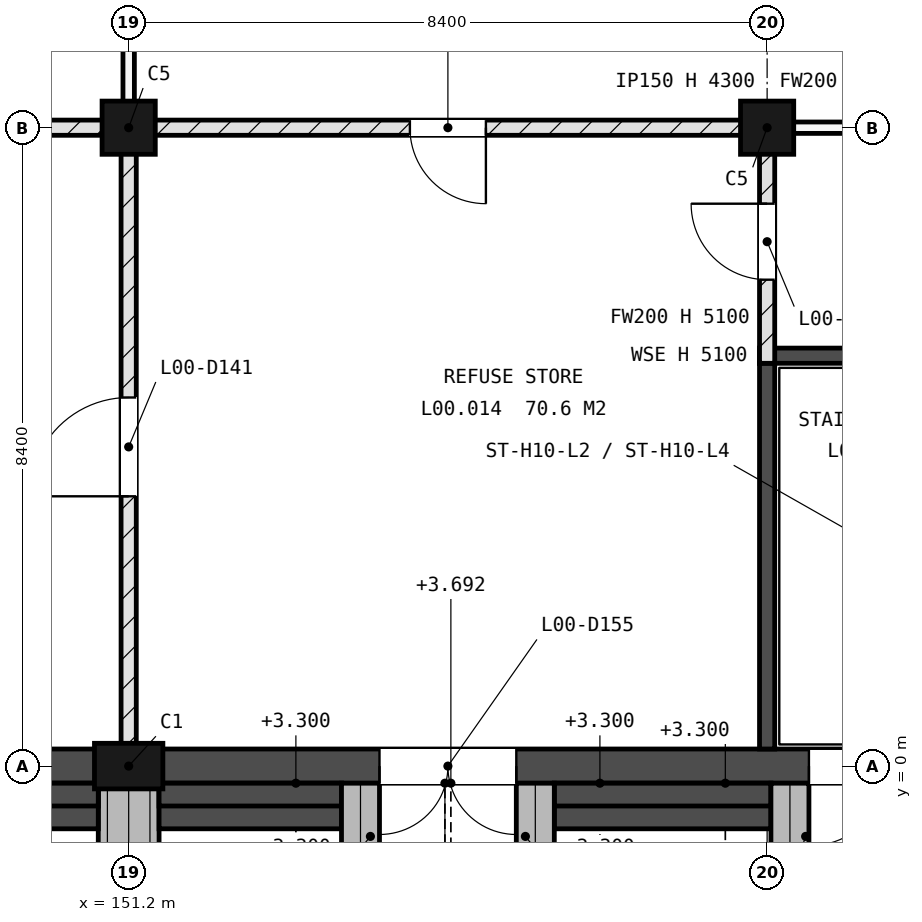
"""IFC4 building model, lengths in metres.
Left out: names, types, materials, properties, quantities, classifications, styles, units other than length and angle.
Written with IfcOpenShell. Run it as: python <this file> out.ifc"""

import sys

from ifc_helpers import new_model, si_unit, direction, frame, frame_2d, origin, origin_2d, place, context, subcontext, project, spatial, rectangle, extrude, element, fill, save


model = new_model("IFC4")
c1 = context("Model", 3, precision=1e-05, world=origin(), true_north=direction((0.0, 1.0)))
c2 = subcontext(c1, "Body", "Model", "MODEL_VIEW")
j1 = project(units=[si_unit("LENGTHUNIT", "METRE"), si_unit("PLANEANGLEUNIT", "RADIAN")], contexts=[c1])
p1 = place(None, origin())
s1 = spatial("IfcSite", under=j1, at=p1, CompositionType="ELEMENT")
p2 = place(p1, origin())
s2 = spatial("IfcBuilding", under=s1, at=p2, CompositionType="ELEMENT")
p3 = place(p2, origin())
s3 = spatial("IfcBuildingStorey", under=s2, at=p3, CompositionType="ELEMENT", Elevation=0.0)
p4 = place(p3, frame((151.2, 0.0, -0.3), z_axis=(0.0, 0.0, 1.0), x_axis=(1.0, 0.0, 0.0)))
e1 = element("IfcColumn", 1, at=p4, inside=s3, PredefinedType="PILASTER", context=c2, shape_type="SweptSolid", body=[
    extrude(rectangle(XDim=0.9, YDim=0.6, at=origin_2d()), origin(), (0.0, 0.0, 1.0), 5.4),
])
for number, where, z_axis, x_axis in (
    (2, (151.2, 8.4, -0.3), (0.0, 0.0, 1.0), (1.0, 0.0, 0.0)),
    (3, (159.6, 8.4, -0.3), (0.0, 0.0, 1.0), (1.0, 0.0, 0.0)),
):
    element("IfcColumn", number, at=place(p3, frame(where, z_axis=z_axis, x_axis=x_axis)), inside=s3, PredefinedType="COLUMN", context=c2, shape_type="SweptSolid", body=[
        extrude(rectangle(XDim=0.7, YDim=0.7, at=origin_2d()), origin(), (0.0, 0.0, 1.0), 5.4),
    ])
p5 = place(p3, frame((0.0, 0.0, -0.3), z_axis=(0.0, 0.0, 1.0), x_axis=(1.0, 0.0, 0.0)))
e4 = element("IfcWall", 4, at=p5, inside=s3, PredefinedType="SOLIDWALL", context=c2, shape_type="SweptSolid", body=[
    extrude(rectangle(XDim=168.0, YDim=0.45, at=frame_2d((84.0, 0.0))), origin(), (0.0, 0.0, 1.0), 5.4),
])
p6 = place(p5, frame((34.8, 0.0, 2.7)))
e5 = element("IfcOpeningElement", 5, at=p6, cuts=e4, PredefinedType="OPENING", context=c2, shape_type="SweptSolid", body=[
    extrude(rectangle(XDim=1.8, YDim=1.2, at=frame_2d((0.9, 0.6))), frame((0.0, 0.235, 0.0), z_axis=(0.0, -1.0, 0.0), x_axis=(1.0, 0.0, 0.0)), (0.0, 0.0, 1.0), 0.47),
])
p7 = place(p5, frame((69.075, 0.0, 1.5)))
e6 = element("IfcOpeningElement", 6, at=p7, cuts=e4, PredefinedType="OPENING", context=c2, shape_type="SweptSolid", body=[
    extrude(rectangle(XDim=0.45, YDim=2.4, at=frame_2d((0.225, 1.2))), frame((0.0, 0.235, 0.0), z_axis=(0.0, -1.0, 0.0), x_axis=(1.0, 0.0, 0.0)), (0.0, 0.0, 1.0), 0.47),
])
p8 = place(p5, frame((73.275, 0.0, 1.5)))
e7 = element("IfcOpeningElement", 7, at=p8, cuts=e4, PredefinedType="OPENING", context=c2, shape_type="SweptSolid", body=[
    extrude(rectangle(XDim=0.45, YDim=2.4, at=frame_2d((0.225, 1.2))), frame((0.0, 0.235, 0.0), z_axis=(0.0, -1.0, 0.0), x_axis=(1.0, 0.0, 0.0)), (0.0, 0.0, 1.0), 0.47),
])
p9 = place(p5, frame((135.0, 0.0, 2.7)))
e8 = element("IfcOpeningElement", 8, at=p9, cuts=e4, PredefinedType="OPENING", context=c2, shape_type="SweptSolid", body=[
    extrude(rectangle(XDim=1.8, YDim=1.2, at=frame_2d((0.9, 0.6))), frame((0.0, 0.235, 0.0), z_axis=(0.0, -1.0, 0.0), x_axis=(1.0, 0.0, 0.0)), (0.0, 0.0, 1.0), 0.47),
])
p10 = place(p5, frame((144.0, 0.0, 2.7)))
e9 = element("IfcOpeningElement", 9, at=p10, cuts=e4, PredefinedType="OPENING", context=c2, shape_type="SweptSolid", body=[
    extrude(rectangle(XDim=1.8, YDim=1.2, at=frame_2d((0.9, 0.6))), frame((0.0, 0.235, 0.0), z_axis=(0.0, -1.0, 0.0), x_axis=(1.0, 0.0, 0.0)), (0.0, 0.0, 1.0), 0.47),
])
p11 = place(p5, frame((114.6, 0.0, 0.3), z_axis=(0.0, 0.0, 1.0), x_axis=(-1.0, 0.0, 0.0)))
e10 = element("IfcOpeningElement", 10, at=p11, cuts=e4, PredefinedType="OPENING", context=c2, shape_type="SweptSolid", body=[
    extrude(rectangle(XDim=2.1, YDim=2.2, at=frame_2d((1.05, 1.1))), frame((0.0, 0.235, 0.0), z_axis=(0.0, -1.0, 0.0), x_axis=(1.0, 0.0, 0.0)), (0.0, 0.0, 1.0), 0.47),
])
p12 = place(p5, frame((117.3, 0.0, 0.3), z_axis=(0.0, 0.0, 1.0), x_axis=(-1.0, 0.0, 0.0)))
e11 = element("IfcOpeningElement", 11, at=p12, cuts=e4, PredefinedType="OPENING", context=c2, shape_type="SweptSolid", body=[
    extrude(rectangle(XDim=2.1, YDim=2.2, at=frame_2d((1.05, 1.1))), frame((0.0, 0.235, 0.0), z_axis=(0.0, -1.0, 0.0), x_axis=(1.0, 0.0, 0.0)), (0.0, 0.0, 1.0), 0.47),
])
p13 = place(p5, frame((106.05, 0.0, 0.3), z_axis=(0.0, 0.0, 1.0), x_axis=(-1.0, 0.0, 0.0)))
e12 = element("IfcOpeningElement", 12, at=p13, cuts=e4, PredefinedType="OPENING", context=c2, shape_type="SweptSolid", body=[
    extrude(rectangle(XDim=2.1, YDim=2.2, at=frame_2d((1.05, 1.1))), frame((0.0, 0.235, 0.0), z_axis=(0.0, -1.0, 0.0), x_axis=(1.0, 0.0, 0.0)), (0.0, 0.0, 1.0), 0.47),
])
p14 = place(p5, frame((57.25, 0.0, 0.3), z_axis=(0.0, 0.0, 1.0), x_axis=(-1.0, 0.0, 0.0)))
e13 = element("IfcOpeningElement", 13, at=p14, cuts=e4, PredefinedType="OPENING", context=c2, shape_type="SweptSolid", body=[
    extrude(rectangle(XDim=2.1, YDim=2.2, at=frame_2d((1.05, 1.1))), frame((0.0, 0.235, 0.0), z_axis=(0.0, -1.0, 0.0), x_axis=(1.0, 0.0, 0.0)), (0.0, 0.0, 1.0), 0.47),
])
p15 = place(p5, frame((120.75, 0.0, 0.3), z_axis=(0.0, 0.0, 1.0), x_axis=(-1.0, 0.0, 0.0)))
e14 = element("IfcOpeningElement", 14, at=p15, cuts=e4, PredefinedType="OPENING", context=c2, shape_type="SweptSolid", body=[
    extrude(rectangle(XDim=2.1, YDim=2.2, at=frame_2d((1.05, 1.1))), frame((0.0, 0.235, 0.0), z_axis=(0.0, -1.0, 0.0), x_axis=(1.0, 0.0, 0.0)), (0.0, 0.0, 1.0), 0.47),
])
p16 = place(p5, frame((124.95, 0.0, 0.3), z_axis=(0.0, 0.0, 1.0), x_axis=(-1.0, 0.0, 0.0)))
e15 = element("IfcOpeningElement", 15, at=p16, cuts=e4, PredefinedType="OPENING", context=c2, shape_type="SweptSolid", body=[
    extrude(rectangle(XDim=2.1, YDim=2.2, at=frame_2d((1.05, 1.1))), frame((0.0, 0.235, 0.0), z_axis=(0.0, -1.0, 0.0), x_axis=(1.0, 0.0, 0.0)), (0.0, 0.0, 1.0), 0.47),
])
p17 = place(p5, frame((19.45, 0.0, 0.3), z_axis=(0.0, 0.0, 1.0), x_axis=(-1.0, 0.0, 0.0)))
e16 = element("IfcOpeningElement", 16, at=p17, cuts=e4, PredefinedType="OPENING", context=c2, shape_type="SweptSolid", body=[
    extrude(rectangle(XDim=2.1, YDim=2.2, at=frame_2d((1.05, 1.1))), frame((0.0, 0.235, 0.0), z_axis=(0.0, -1.0, 0.0), x_axis=(1.0, 0.0, 0.0)), (0.0, 0.0, 1.0), 0.47),
])
p18 = place(p5, frame((162.25, 0.0, 0.3), z_axis=(0.0, 0.0, 1.0), x_axis=(-1.0, 0.0, 0.0)))
e17 = element("IfcOpeningElement", 17, at=p18, cuts=e4, PredefinedType="OPENING", context=c2, shape_type="SweptSolid", body=[
    extrude(rectangle(XDim=2.1, YDim=2.2, at=frame_2d((1.05, 1.1))), frame((0.0, 0.235, 0.0), z_axis=(0.0, -1.0, 0.0), x_axis=(1.0, 0.0, 0.0)), (0.0, 0.0, 1.0), 0.47),
])
p19 = place(p5, frame((4.8, 0.0, 0.3), z_axis=(0.0, 0.0, 1.0), x_axis=(-1.0, 0.0, 0.0)))
e18 = element("IfcOpeningElement", 18, at=p19, cuts=e4, PredefinedType="OPENING", context=c2, shape_type="SweptSolid", body=[
    extrude(rectangle(XDim=1.2, YDim=2.2, at=frame_2d((0.6, 1.1))), frame((0.0, 0.235, 0.0), z_axis=(0.0, -1.0, 0.0), x_axis=(1.0, 0.0, 0.0)), (0.0, 0.0, 1.0), 0.47),
])
p20 = place(p5, frame((64.8, 0.0, 0.3), z_axis=(0.0, 0.0, 1.0), x_axis=(-1.0, 0.0, 0.0)))
e19 = element("IfcOpeningElement", 19, at=p20, cuts=e4, PredefinedType="OPENING", context=c2, shape_type="SweptSolid", body=[
    extrude(rectangle(XDim=1.2, YDim=2.2, at=frame_2d((0.6, 1.1))), frame((0.0, 0.235, 0.0), z_axis=(0.0, -1.0, 0.0), x_axis=(1.0, 0.0, 0.0)), (0.0, 0.0, 1.0), 0.47),
])
p21 = place(p5, frame((81.0, 0.0, 0.3), z_axis=(0.0, 0.0, 1.0), x_axis=(-1.0, 0.0, 0.0)))
e20 = element("IfcOpeningElement", 20, at=p21, cuts=e4, PredefinedType="OPENING", context=c2, shape_type="SweptSolid", body=[
    extrude(rectangle(XDim=2.4, YDim=2.4, at=frame_2d((1.2, 1.2))), frame((0.0, 0.235, 0.0), z_axis=(0.0, -1.0, 0.0), x_axis=(1.0, 0.0, 0.0)), (0.0, 0.0, 1.0), 0.47),
])
p22 = place(p5, frame((97.8, 0.0, 0.3), z_axis=(0.0, 0.0, 1.0), x_axis=(-1.0, 0.0, 0.0)))
e21 = element("IfcOpeningElement", 21, at=p22, cuts=e4, PredefinedType="OPENING", context=c2, shape_type="SweptSolid", body=[
    extrude(rectangle(XDim=2.4, YDim=2.4, at=frame_2d((1.2, 1.2))), frame((0.0, 0.235, 0.0), z_axis=(0.0, -1.0, 0.0), x_axis=(1.0, 0.0, 0.0)), (0.0, 0.0, 1.0), 0.47),
])
p23 = place(p5, frame((139.8, 0.0, 0.3), z_axis=(0.0, 0.0, 1.0), x_axis=(-1.0, 0.0, 0.0)))
e22 = element("IfcOpeningElement", 22, at=p23, cuts=e4, PredefinedType="OPENING", context=c2, shape_type="SweptSolid", body=[
    extrude(rectangle(XDim=2.4, YDim=2.1, at=frame_2d((1.2, 1.05))), frame((0.0, 0.235, 0.0), z_axis=(0.0, -1.0, 0.0), x_axis=(1.0, 0.0, 0.0)), (0.0, 0.0, 1.0), 0.47),
])
p24 = place(p5, frame((156.3, 0.0, 0.3), z_axis=(0.0, 0.0, 1.0), x_axis=(-1.0, 0.0, 0.0)))
e23 = element("IfcOpeningElement", 23, at=p24, cuts=e4, PredefinedType="OPENING", context=c2, shape_type="SweptSolid", body=[
    extrude(rectangle(XDim=1.8, YDim=2.2, at=frame_2d((0.9, 1.1))), frame((0.0, 0.235, 0.0), z_axis=(0.0, -1.0, 0.0), x_axis=(1.0, 0.0, 0.0)), (0.0, 0.0, 1.0), 0.47),
])
p25 = place(p3, frame((151.2, -0.225, 0.0), z_axis=(0.0, 0.0, 1.0), x_axis=(0.0, -1.0, 0.0)))
e24 = element("IfcWall", 24, at=p25, inside=s3, PredefinedType="SOLIDWALL", context=c2, shape_type="SweptSolid", body=[
    extrude(rectangle(XDim=0.9, YDim=0.8, at=frame_2d((0.45, 0.0))), origin(), (0.0, 0.0, 1.0), 5.1),
])
p26 = place(p3, frame((143.2, -0.525, 0.0), z_axis=(0.0, 0.0, 1.0), x_axis=(1.0, 0.0, 0.0)))
e25 = element("IfcWall", 25, at=p26, inside=s3, PredefinedType="SOLIDWALL", context=c2, shape_type="SweptSolid", body=[
    extrude(rectangle(XDim=7.6, YDim=0.6, at=frame_2d((3.8, 0.0))), origin(), (0.0, 0.0, 1.0), 0.45),
])
p27 = place(p3, frame((143.2, -0.375, 0.45), z_axis=(0.0, 0.0, 1.0), x_axis=(1.0, 0.0, 0.0)))
e26 = element("IfcWall", 26, at=p27, inside=s3, PredefinedType="SOLIDWALL", context=c2, shape_type="SweptSolid", body=[
    extrude(rectangle(XDim=7.6, YDim=0.3, at=frame_2d((3.8, 0.0))), origin(), (0.0, 0.0, 1.0), 0.45),
])
p28 = place(p3, frame((151.6, -0.525, 0.0), z_axis=(0.0, 0.0, 1.0), x_axis=(1.0, 0.0, 0.0)))
e27 = element("IfcWall", 27, at=p28, inside=s3, PredefinedType="SOLIDWALL", context=c2, shape_type="SweptSolid", body=[
    extrude(rectangle(XDim=2.4, YDim=0.6, at=frame_2d((1.2, 0.0))), origin(), (0.0, 0.0, 1.0), 0.45),
])
p29 = place(p3, frame((151.6, -0.375, 0.45), z_axis=(0.0, 0.0, 1.0), x_axis=(1.0, 0.0, 0.0)))
e28 = element("IfcWall", 28, at=p29, inside=s3, PredefinedType="SOLIDWALL", context=c2, shape_type="SweptSolid", body=[
    extrude(rectangle(XDim=2.4, YDim=0.3, at=frame_2d((1.2, 0.0))), origin(), (0.0, 0.0, 1.0), 0.45),
])
p30 = place(p3, frame((156.8, -0.525, 0.0), z_axis=(0.0, 0.0, 1.0), x_axis=(1.0, 0.0, 0.0)))
e29 = element("IfcWall", 29, at=p30, inside=s3, PredefinedType="SOLIDWALL", context=c2, shape_type="SweptSolid", body=[
    extrude(rectangle(XDim=2.85, YDim=0.6, at=frame_2d((1.425, 0.0))), origin(), (0.0, 0.0, 1.0), 0.45),
])
p31 = place(p3, frame((156.8, -0.375, 0.45), z_axis=(0.0, 0.0, 1.0), x_axis=(1.0, 0.0, 0.0)))
e30 = element("IfcWall", 30, at=p31, inside=s3, PredefinedType="SOLIDWALL", context=c2, shape_type="SweptSolid", body=[
    extrude(rectangle(XDim=2.85, YDim=0.3, at=frame_2d((1.425, 0.0))), origin(), (0.0, 0.0, 1.0), 0.45),
])
for number, where, z_axis, x_axis in (
    (31, (154.25, -0.225, 0.0), (0.0, 0.0, 1.0), (0.0, -1.0, 0.0)),
    (32, (156.55, -0.225, 0.0), (0.0, 0.0, 1.0), (0.0, -1.0, 0.0)),
    (33, (159.9, -0.225, 0.0), (0.0, 0.0, 1.0), (0.0, -1.0, 0.0)),
):
    element("IfcWall", number, at=place(p3, frame(where, z_axis=z_axis, x_axis=x_axis)), inside=s3, PredefinedType="SOLIDWALL", context=c2, shape_type="SweptSolid", body=[
        extrude(rectangle(XDim=1.4, YDim=0.5, at=frame_2d((0.7, 0.0))), origin(), (0.0, 0.0, 1.0), 3.08),
    ])
p32 = place(p3, frame((159.5, 5.4, 0.0), z_axis=(0.0, 0.0, 1.0), x_axis=(1.0, 0.0, 0.0)))
e34 = element("IfcWall", 34, at=p32, inside=s3, PredefinedType="SHEAR", context=c2, shape_type="SweptSolid", body=[
    extrude(rectangle(XDim=8.325, YDim=0.2, at=frame_2d((4.163, 0.0))), origin(), (0.0, 0.0, 1.0), 5.1),
])
p33 = place(p3, frame((159.6, 0.225, 0.0), z_axis=(0.0, 0.0, 1.0), x_axis=(0.0, 1.0, 0.0)))
e35 = element("IfcWall", 35, at=p33, inside=s3, PredefinedType="SHEAR", context=c2, shape_type="SweptSolid", body=[
    extrude(rectangle(XDim=5.075, YDim=0.2, at=frame_2d((2.538, 0.0))), origin(), (0.0, 0.0, 1.0), 5.1),
])
p34 = place(p3, frame((117.6, 8.4, 0.0), z_axis=(0.0, 0.0, 1.0), x_axis=(1.0, 0.0, 0.0)))
e36 = element("IfcWall", 36, at=p34, inside=s3, PredefinedType="SOLIDWALL", context=c2, shape_type="SweptSolid", body=[
    extrude(rectangle(XDim=42.0, YDim=0.2, at=frame_2d((21.0, 0.0))), origin(), (0.0, 0.0, 1.0), 4.3),
])
p35 = place(p34, frame((37.3, 0.0, 0.0)))
e37 = element("IfcOpeningElement", 37, at=p35, cuts=e36, PredefinedType="OPENING", context=c2, shape_type="SweptSolid", body=[
    extrude(rectangle(XDim=1.0, YDim=2.1, at=frame_2d((0.5, 1.05))), frame((0.0, 0.11, 0.0), z_axis=(0.0, -1.0, 0.0), x_axis=(1.0, 0.0, 0.0)), (0.0, 0.0, 1.0), 0.22),
])
p36 = place(p3, frame((159.6, 8.4, 0.0), z_axis=(0.0, 0.0, 1.0), x_axis=(1.0, 0.0, 0.0)))
e38 = element("IfcWall", 38, at=p36, inside=s3, PredefinedType="PARTITIONING", context=c2, shape_type="SweptSolid", body=[
    extrude(rectangle(XDim=8.4, YDim=0.15, at=frame_2d((4.2, 0.0))), origin(), (0.0, 0.0, 1.0), 4.3),
])
p37 = place(p36, frame((3.7, 0.0, 0.0)))
e39 = element("IfcOpeningElement", 39, at=p37, cuts=e38, PredefinedType="OPENING", context=c2, shape_type="SweptSolid", body=[
    extrude(rectangle(XDim=1.0, YDim=2.1, at=frame_2d((0.5, 1.05))), frame((0.0, 0.085, 0.0), z_axis=(0.0, -1.0, 0.0), x_axis=(1.0, 0.0, 0.0)), (0.0, 0.0, 1.0), 0.17),
])
p38 = place(p3, frame((151.2, 0.225, 0.0), z_axis=(0.0, 0.0, 1.0), x_axis=(0.0, 1.0, 0.0)))
e40 = element("IfcWall", 40, at=p38, inside=s3, PredefinedType="SOLIDWALL", context=c2, shape_type="SweptSolid", body=[
    extrude(rectangle(XDim=8.075, YDim=0.2, at=frame_2d((4.038, 0.0))), origin(), (0.0, 0.0, 1.0), 4.3),
])
p39 = place(p38, frame((3.325, 0.0, 0.0)))
e41 = element("IfcOpeningElement", 41, at=p39, cuts=e40, PredefinedType="OPENING", context=c2, shape_type="SweptSolid", body=[
    extrude(rectangle(XDim=1.3, YDim=2.1, at=frame_2d((0.65, 1.05))), frame((0.0, 0.11, 0.0), z_axis=(0.0, -1.0, 0.0), x_axis=(1.0, 0.0, 0.0)), (0.0, 0.0, 1.0), 0.22),
])
p40 = place(p3, frame((151.2, 8.5, 0.0), z_axis=(0.0, 0.0, 1.0), x_axis=(0.0, 1.0, 0.0)))
e42 = element("IfcWall", 42, at=p40, inside=s3, PredefinedType="PARTITIONING", context=c2, shape_type="SweptSolid", body=[
    extrude(rectangle(XDim=16.625, YDim=0.15, at=frame_2d((8.312, 0.0))), origin(), (0.0, 0.0, 1.0), 4.3),
])
p41 = place(p40, frame((3.16, 0.0, 0.0)))
e43 = element("IfcOpeningElement", 43, at=p41, cuts=e42, PredefinedType="OPENING", context=c2, shape_type="SweptSolid", body=[
    extrude(rectangle(XDim=1.0, YDim=2.1, at=frame_2d((0.5, 1.05))), frame((0.0, 0.085, 0.0), z_axis=(0.0, -1.0, 0.0), x_axis=(1.0, 0.0, 0.0)), (0.0, 0.0, 1.0), 0.17),
])
p42 = place(p3, frame((159.6, 5.3, 0.0), z_axis=(0.0, 0.0, 1.0), x_axis=(0.0, 1.0, 0.0)))
e44 = element("IfcWall", 44, at=p42, inside=s3, PredefinedType="SOLIDWALL", context=c2, shape_type="SweptSolid", body=[
    extrude(rectangle(XDim=3.0, YDim=0.2, at=frame_2d((1.5, 0.0))), origin(), (0.0, 0.0, 1.0), 5.1),
])
p43 = place(p42, frame((1.1, 0.0, 0.0)))
e45 = element("IfcOpeningElement", 45, at=p43, cuts=e44, PredefinedType="OPENING", context=c2, shape_type="SweptSolid", body=[
    extrude(rectangle(XDim=1.0, YDim=2.1, at=frame_2d((0.5, 1.05))), frame((0.0, 0.11, 0.0), z_axis=(0.0, -1.0, 0.0), x_axis=(1.0, 0.0, 0.0)), (0.0, 0.0, 1.0), 0.22),
])
p44 = place(p18, origin())
e46 = element("IfcDoor", 46, at=p44, inside=s3, OperationType="SINGLE_SWING_LEFT", PredefinedType="DOOR", context=c2, shape_type="SweptSolid", body=[
    extrude(rectangle(XDim=2.1, YDim=0.013, at=frame_2d((1.05, 0.007))), frame((0.0, 0.115, 0.0), z_axis=(0.0, -1.0, 0.0), x_axis=(1.0, 0.0, 0.0)), (0.0, 0.0, 1.0), 0.23),
    extrude(rectangle(XDim=0.075, YDim=2.112, at=frame_2d((0.038, 1.069))), frame((0.0, 0.125, 0.0), z_axis=(0.0, -1.0, 0.0), x_axis=(1.0, 0.0, 0.0)), (0.0, 0.0, 1.0), 0.25),
    extrude(rectangle(XDim=0.075, YDim=2.112, at=frame_2d((2.062, 1.069))), frame((0.0, 0.125, 0.0), z_axis=(0.0, -1.0, 0.0), x_axis=(1.0, 0.0, 0.0)), (0.0, 0.0, 1.0), 0.25),
    extrude(rectangle(XDim=2.1, YDim=0.075, at=frame_2d((1.05, 2.163))), frame((0.0, 0.115, 0.0), z_axis=(0.0, -1.0, 0.0), x_axis=(1.0, 0.0, 0.0)), (0.0, 0.0, 1.0), 0.23),
    extrude(rectangle(XDim=1.95, YDim=2.112, at=frame_2d((1.05, 1.069))), frame((0.0, 0.025, 0.0), z_axis=(0.0, -1.0, 0.0), x_axis=(1.0, 0.0, 0.0)), (0.0, 0.0, 1.0), 0.05),
])
fill(e17, e46)
p45 = place(p24, origin())
e47 = element("IfcDoor", 47, at=p45, inside=s3, OperationType="SINGLE_SWING_LEFT", PredefinedType="DOOR", context=c2, shape_type="SweptSolid", body=[
    extrude(rectangle(XDim=1.8, YDim=0.013, at=frame_2d((0.9, 0.007))), frame((0.0, 0.115, 0.0), z_axis=(0.0, -1.0, 0.0), x_axis=(1.0, 0.0, 0.0)), (0.0, 0.0, 1.0), 0.23),
    extrude(rectangle(XDim=0.075, YDim=2.112, at=frame_2d((0.038, 1.069))), frame((0.0, 0.125, 0.0), z_axis=(0.0, -1.0, 0.0), x_axis=(1.0, 0.0, 0.0)), (0.0, 0.0, 1.0), 0.25),
    extrude(rectangle(XDim=0.075, YDim=2.112, at=frame_2d((1.763, 1.069))), frame((0.0, 0.125, 0.0), z_axis=(0.0, -1.0, 0.0), x_axis=(1.0, 0.0, 0.0)), (0.0, 0.0, 1.0), 0.25),
    extrude(rectangle(XDim=1.8, YDim=0.075, at=frame_2d((0.9, 2.163))), frame((0.0, 0.115, 0.0), z_axis=(0.0, -1.0, 0.0), x_axis=(1.0, 0.0, 0.0)), (0.0, 0.0, 1.0), 0.23),
    extrude(rectangle(XDim=1.65, YDim=2.112, at=frame_2d((0.9, 1.069))), frame((0.0, 0.025, 0.0), z_axis=(0.0, -1.0, 0.0), x_axis=(1.0, 0.0, 0.0)), (0.0, 0.0, 1.0), 0.05),
])
fill(e23, e47)
p46 = place(p39, origin())
e48 = element("IfcDoor", 48, at=p46, inside=s3, OperationType="SINGLE_SWING_RIGHT", PredefinedType="DOOR", context=c2, shape_type="SweptSolid", body=[
    extrude(rectangle(XDim=1.3, YDim=2.1, at=frame_2d((0.65, 1.05))), frame((0.0, 0.025, 0.0), z_axis=(0.0, -1.0, 0.0), x_axis=(1.0, 0.0, 0.0)), (0.0, 0.0, 1.0), 0.05),
])
fill(e41, e48)
p47 = place(p43, origin())
e49 = element("IfcDoor", 49, at=p47, inside=s3, OperationType="SINGLE_SWING_LEFT", PredefinedType="DOOR", context=c2, shape_type="SweptSolid", body=[
    extrude(rectangle(XDim=1.0, YDim=2.1, at=frame_2d((0.5, 1.05))), frame((0.0, 0.025, 0.0), z_axis=(0.0, -1.0, 0.0), x_axis=(1.0, 0.0, 0.0)), (0.0, 0.0, 1.0), 0.05),
])
fill(e45, e49)
p48 = place(p35, origin())
e50 = element("IfcDoor", 50, at=p48, inside=s3, OperationType="SINGLE_SWING_RIGHT", PredefinedType="DOOR", context=c2, shape_type="SweptSolid", body=[
    extrude(rectangle(XDim=1.0, YDim=2.1, at=frame_2d((0.5, 1.05))), frame((0.0, 0.025, 0.0), z_axis=(0.0, -1.0, 0.0), x_axis=(1.0, 0.0, 0.0)), (0.0, 0.0, 1.0), 0.05),
])
fill(e37, e50)
save(model, sys.argv[1])
